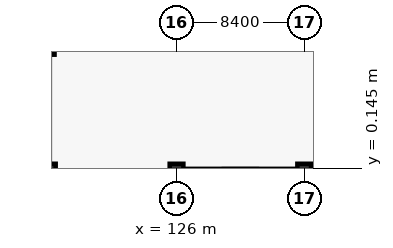
"""IFC4 building model, lengths in metres.
Left out: names, types, materials, properties, quantities, classifications, styles, units other than length and angle.
Written with IfcOpenShell. Run it as: python <this file> out.ifc"""

import sys

from ifc_helpers import new_model, si_unit, direction, frame, origin, origin_2d, place, context, subcontext, project, spatial, circle, extrude, element, save


model = new_model("IFC4")
c1 = context("Model", 3, precision=1e-05, world=origin(), true_north=direction((0.0, 1.0)))
c2 = subcontext(c1, "Body", "Model", "MODEL_VIEW")
j1 = project(units=[si_unit("LENGTHUNIT", "METRE"), si_unit("PLANEANGLEUNIT", "RADIAN")], contexts=[c1])
p1 = place(None, origin())
s1 = spatial("IfcSite", under=j1, at=p1, CompositionType="ELEMENT")
p2 = place(p1, origin())
s2 = spatial("IfcBuilding", under=s1, at=p2, CompositionType="ELEMENT")
p3 = place(p2, origin())
s3 = spatial("IfcBuildingStorey", under=s2, at=p3, CompositionType="ELEMENT", Elevation=0.0)
p4 = place(p3, frame((117.6, 0.0, 0.0), z_axis=(0.0, 0.0, 1.0), x_axis=(1.0, 0.0, 0.0)))
e1 = element("IfcColumn", 1, at=p4, inside=s3, PredefinedType="COLUMN", context=c2, shape_type="SweptSolid", body=[
    extrude(circle(Radius=0.45, at=origin_2d()), origin(), (0.0, 0.0, 1.0), 6.0),
])
p5 = place(p3, frame((117.6, 8.0, 0.0), z_axis=(0.0, 0.0, 1.0), x_axis=(1.0, 0.0, 0.0)))
e2 = element("IfcColumn", 2, at=p5, inside=s3, PredefinedType="COLUMN", context=c2, shape_type="SweptSolid", body=[
    extrude(circle(Radius=0.375, at=origin_2d()), origin(), (0.0, 0.0, 1.0), 6.0),
])
for number, where, z_axis, x_axis in (
    (3, (126.0, 0.0, 0.0), (0.0, 0.0, 1.0), (1.0, 0.0, 0.0)),
    (4, (134.4, 0.0, 0.0), (0.0, 0.0, 1.0), (1.0, 0.0, 0.0)),
):
    element("IfcColumn", number, at=place(p3, frame(where, z_axis=z_axis, x_axis=x_axis)), inside=s3, PredefinedType="COLUMN", context=c2, shape_type="SweptSolid", body=[
        extrude(circle(Radius=0.45, at=origin_2d()), origin(), (0.0, 0.0, 1.0), 6.0),
    ])
save(model, sys.argv[1])
